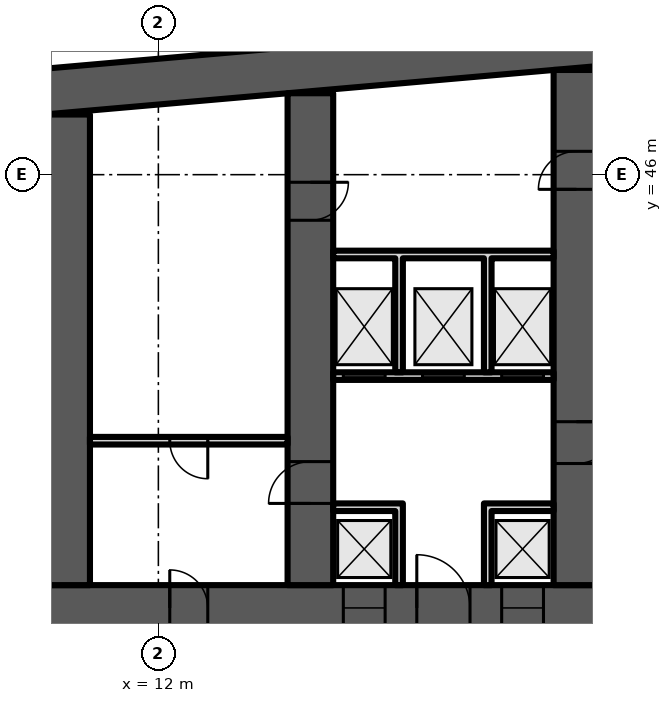
"""IFC4 building model, lengths in metres.
Left out: names, types, materials, properties, quantities, classifications, styles, units other than length and angle.
Written with IfcOpenShell. Run it as: python <this file> out.ifc"""

import sys

from ifc_helpers import new_model, si_unit, direction, frame, frame_2d, origin, place, context, subcontext, project, spatial, polyline, rectangle, outline, extrude, element, fill, save


model = new_model("IFC4")
c1 = context("Model", 3, precision=1e-05, world=origin(), true_north=direction((0.0, 1.0)))
c2 = subcontext(c1, "Body", "Model", "MODEL_VIEW")
j1 = project(units=[si_unit("LENGTHUNIT", "METRE"), si_unit("PLANEANGLEUNIT", "RADIAN")], contexts=[c1])
p1 = place(None, origin())
s1 = spatial("IfcSite", under=j1, at=p1, CompositionType="ELEMENT")
p2 = place(p1, origin())
s2 = spatial("IfcBuilding", under=s1, at=p2, CompositionType="ELEMENT")
p3 = place(p2, frame((0.0, 0.0, 77.5)))
s3 = spatial("IfcBuildingStorey", under=s2, at=p3, CompositionType="ELEMENT", Elevation=77.5)
p4 = place(p3, origin())
e1 = element("IfcWall", 1, at=p4, inside=s3, PredefinedType="SHEAR", context=c2, shape_type="SweptSolid", body=[
    extrude(outline(polyline([(9.0, 47.583), (37.0, 50.032), (65.0, 47.583), (65.0, 48.787), (37.0, 51.237), (9.0, 48.787), (9.0, 47.583)])), origin(), (0.0, 0.0, 1.0), 3.6),
])
p5 = place(p3, frame((9.0, 34.6, 0.0), z_axis=(0.0, 0.0, 1.0), x_axis=(1.0, 0.0, 0.0)))
e2 = element("IfcWall", 2, at=p5, inside=s3, PredefinedType="SHEAR", context=c2, shape_type="SweptSolid", body=[
    extrude(rectangle(XDim=56.0, YDim=1.2, at=frame_2d((28.0, 0.0))), origin(), (0.0, 0.0, 1.0), 3.6),
])
p6 = place(p5, frame((3.3, 0.0, 0.0)))
e3 = element("IfcOpeningElement", 3, at=p6, cuts=e2, PredefinedType="OPENING", context=c2, shape_type="SweptSolid", body=[
    extrude(rectangle(XDim=1.0, YDim=2.1, at=frame_2d((0.5, 1.05))), frame((0.0, 0.61, 0.0), z_axis=(0.0, -1.0, 0.0), x_axis=(1.0, 0.0, 0.0)), (0.0, 0.0, 1.0), 1.22),
])
p7 = place(p5, frame((7.867, 0.0, 0.0)))
e4 = element("IfcOpeningElement", 4, at=p7, cuts=e2, PredefinedType="OPENING", context=c2, shape_type="SweptSolid", body=[
    extrude(rectangle(XDim=1.1, YDim=2.1, at=frame_2d((0.55, 1.05))), frame((0.0, 0.61, 0.0), z_axis=(0.0, -1.0, 0.0), x_axis=(1.0, 0.0, 0.0)), (0.0, 0.0, 1.0), 1.22),
])
p8 = place(p5, frame((12.033, 0.0, 0.0)))
e5 = element("IfcOpeningElement", 5, at=p8, cuts=e2, PredefinedType="OPENING", context=c2, shape_type="SweptSolid", body=[
    extrude(rectangle(XDim=1.1, YDim=2.1, at=frame_2d((0.55, 1.05))), frame((0.0, 0.61, 0.0), z_axis=(0.0, -1.0, 0.0), x_axis=(1.0, 0.0, 0.0)), (0.0, 0.0, 1.0), 1.22),
])
p9 = place(p5, frame((9.8, 0.0, 0.0)))
e6 = element("IfcOpeningElement", 6, at=p9, cuts=e2, PredefinedType="OPENING", context=c2, shape_type="SweptSolid", body=[
    extrude(rectangle(XDim=1.4, YDim=2.1, at=frame_2d((0.7, 1.05))), frame((0.0, 0.61, 0.0), z_axis=(0.0, -1.0, 0.0), x_axis=(1.0, 0.0, 0.0)), (0.0, 0.0, 1.0), 1.22),
])
p10 = place(p5, frame((14.65, 0.0, 0.0)))
e7 = element("IfcOpeningElement", 7, at=p10, cuts=e2, PredefinedType="OPENING", context=c2, shape_type="SweptSolid", body=[
    extrude(rectangle(XDim=1.2, YDim=2.1, at=frame_2d((0.6, 1.05))), frame((0.0, 0.61, 0.0), z_axis=(0.0, -1.0, 0.0), x_axis=(1.0, 0.0, 0.0)), (0.0, 0.0, 1.0), 1.22),
])
p11 = place(p5, frame((21.867, 0.0, 0.0)))
e8 = element("IfcOpeningElement", 8, at=p11, cuts=e2, PredefinedType="OPENING", context=c2, shape_type="SweptSolid", body=[
    extrude(rectangle(XDim=1.1, YDim=2.1, at=frame_2d((0.55, 1.05))), frame((0.0, 0.61, 0.0), z_axis=(0.0, -1.0, 0.0), x_axis=(1.0, 0.0, 0.0)), (0.0, 0.0, 1.0), 1.22),
])
p12 = place(p5, frame((26.033, 0.0, 0.0)))
e9 = element("IfcOpeningElement", 9, at=p12, cuts=e2, PredefinedType="OPENING", context=c2, shape_type="SweptSolid", body=[
    extrude(rectangle(XDim=1.1, YDim=2.1, at=frame_2d((0.55, 1.05))), frame((0.0, 0.61, 0.0), z_axis=(0.0, -1.0, 0.0), x_axis=(1.0, 0.0, 0.0)), (0.0, 0.0, 1.0), 1.22),
])
p13 = place(p5, frame((23.8, 0.0, 0.0)))
e10 = element("IfcOpeningElement", 10, at=p13, cuts=e2, PredefinedType="OPENING", context=c2, shape_type="SweptSolid", body=[
    extrude(rectangle(XDim=1.4, YDim=2.1, at=frame_2d((0.7, 1.05))), frame((0.0, 0.61, 0.0), z_axis=(0.0, -1.0, 0.0), x_axis=(1.0, 0.0, 0.0)), (0.0, 0.0, 1.0), 1.22),
])
p14 = place(p5, frame((28.867, 0.0, 0.0)))
e11 = element("IfcOpeningElement", 11, at=p14, cuts=e2, PredefinedType="OPENING", context=c2, shape_type="SweptSolid", body=[
    extrude(rectangle(XDim=1.1, YDim=2.1, at=frame_2d((0.55, 1.05))), frame((0.0, 0.61, 0.0), z_axis=(0.0, -1.0, 0.0), x_axis=(1.0, 0.0, 0.0)), (0.0, 0.0, 1.0), 1.22),
])
p15 = place(p5, frame((33.033, 0.0, 0.0)))
e12 = element("IfcOpeningElement", 12, at=p15, cuts=e2, PredefinedType="OPENING", context=c2, shape_type="SweptSolid", body=[
    extrude(rectangle(XDim=1.1, YDim=2.1, at=frame_2d((0.55, 1.05))), frame((0.0, 0.61, 0.0), z_axis=(0.0, -1.0, 0.0), x_axis=(1.0, 0.0, 0.0)), (0.0, 0.0, 1.0), 1.22),
])
p16 = place(p5, frame((40.15, 0.0, 0.0)))
e13 = element("IfcOpeningElement", 13, at=p16, cuts=e2, PredefinedType="OPENING", context=c2, shape_type="SweptSolid", body=[
    extrude(rectangle(XDim=1.2, YDim=2.1, at=frame_2d((0.6, 1.05))), frame((0.0, 0.61, 0.0), z_axis=(0.0, -1.0, 0.0), x_axis=(1.0, 0.0, 0.0)), (0.0, 0.0, 1.0), 1.22),
])
p17 = place(p5, frame((44.8, 0.0, 0.0)))
e14 = element("IfcOpeningElement", 14, at=p17, cuts=e2, PredefinedType="OPENING", context=c2, shape_type="SweptSolid", body=[
    extrude(rectangle(XDim=1.4, YDim=2.1, at=frame_2d((0.7, 1.05))), frame((0.0, 0.61, 0.0), z_axis=(0.0, -1.0, 0.0), x_axis=(1.0, 0.0, 0.0)), (0.0, 0.0, 1.0), 1.22),
])
p18 = place(p5, frame((49.867, 0.0, 0.0)))
e15 = element("IfcOpeningElement", 15, at=p18, cuts=e2, PredefinedType="OPENING", context=c2, shape_type="SweptSolid", body=[
    extrude(rectangle(XDim=1.1, YDim=2.1, at=frame_2d((0.55, 1.05))), frame((0.0, 0.61, 0.0), z_axis=(0.0, -1.0, 0.0), x_axis=(1.0, 0.0, 0.0)), (0.0, 0.0, 1.0), 1.22),
])
p19 = place(p5, frame((53.5, 0.0, 0.0)))
e16 = element("IfcOpeningElement", 16, at=p19, cuts=e2, PredefinedType="OPENING", context=c2, shape_type="SweptSolid", body=[
    extrude(rectangle(XDim=1.1, YDim=2.1, at=frame_2d((0.55, 1.05))), frame((0.0, 0.61, 0.0), z_axis=(0.0, -1.0, 0.0), x_axis=(1.0, 0.0, 0.0)), (0.0, 0.0, 1.0), 1.22),
])
p20 = place(p5, frame((51.567, 0.0, 0.0)))
e17 = element("IfcOpeningElement", 17, at=p20, cuts=e2, PredefinedType="OPENING", context=c2, shape_type="SweptSolid", body=[
    extrude(rectangle(XDim=1.4, YDim=2.1, at=frame_2d((0.7, 1.05))), frame((0.0, 0.61, 0.0), z_axis=(0.0, -1.0, 0.0), x_axis=(1.0, 0.0, 0.0)), (0.0, 0.0, 1.0), 1.22),
])
p21 = place(p3, frame((9.6, 35.2, 0.0), z_axis=(0.0, 0.0, 1.0), x_axis=(0.0, 1.0, 0.0)))
e18 = element("IfcWall", 18, at=p21, inside=s3, PredefinedType="SHEAR", context=c2, shape_type="SweptSolid", body=[
    extrude(rectangle(XDim=12.383, YDim=1.2, at=frame_2d((6.191, 0.0))), origin(), (0.0, 0.0, 1.0), 3.6),
])
p22 = place(p3, frame((16.0, 35.2, 0.0), z_axis=(0.0, 0.0, 1.0), x_axis=(0.0, 1.0, 0.0)))
e19 = element("IfcWall", 19, at=p22, inside=s3, PredefinedType="SHEAR", context=c2, shape_type="SweptSolid", body=[
    extrude(rectangle(XDim=12.943, YDim=1.2, at=frame_2d((6.471, 0.0))), origin(), (0.0, 0.0, 1.0), 3.6),
])
p23 = place(p22, frame((2.15, 0.0, 0.0)))
e20 = element("IfcOpeningElement", 20, at=p23, cuts=e19, PredefinedType="OPENING", context=c2, shape_type="SweptSolid", body=[
    extrude(rectangle(XDim=1.1, YDim=2.1, at=frame_2d((0.55, 1.05))), frame((0.0, 0.61, 0.0), z_axis=(0.0, -1.0, 0.0), x_axis=(1.0, 0.0, 0.0)), (0.0, 0.0, 1.0), 1.22),
])
p24 = place(p22, frame((9.6, 0.0, 0.0)))
e21 = element("IfcOpeningElement", 21, at=p24, cuts=e19, PredefinedType="OPENING", context=c2, shape_type="SweptSolid", body=[
    extrude(rectangle(XDim=1.0, YDim=2.1, at=frame_2d((0.5, 1.05))), frame((0.0, 0.61, 0.0), z_axis=(0.0, -1.0, 0.0), x_axis=(1.0, 0.0, 0.0)), (0.0, 0.0, 1.0), 1.22),
])
p25 = place(p3, frame((23.0, 35.2, 0.0), z_axis=(0.0, 0.0, 1.0), x_axis=(0.0, 1.0, 0.0)))
e22 = element("IfcWall", 22, at=p25, inside=s3, PredefinedType="SHEAR", context=c2, shape_type="SweptSolid", body=[
    extrude(rectangle(XDim=13.555, YDim=1.2, at=frame_2d((6.778, 0.0))), origin(), (0.0, 0.0, 1.0), 3.6),
])
p26 = place(p25, frame((10.414, 0.0, 0.0)))
e23 = element("IfcOpeningElement", 23, at=p26, cuts=e22, PredefinedType="OPENING", context=c2, shape_type="SweptSolid", body=[
    extrude(rectangle(XDim=1.0, YDim=2.1, at=frame_2d((0.5, 1.05))), frame((0.0, 0.61, 0.0), z_axis=(0.0, -1.0, 0.0), x_axis=(1.0, 0.0, 0.0)), (0.0, 0.0, 1.0), 1.22),
])
p27 = place(p25, frame((3.2, 0.0, 0.0)))
e24 = element("IfcOpeningElement", 24, at=p27, cuts=e22, PredefinedType="OPENING", context=c2, shape_type="SweptSolid", body=[
    extrude(rectangle(XDim=1.1, YDim=2.1, at=frame_2d((0.55, 1.05))), frame((0.0, 0.61, 0.0), z_axis=(0.0, -1.0, 0.0), x_axis=(1.0, 0.0, 0.0)), (0.0, 0.0, 1.0), 1.22),
])
p28 = place(p3, frame((10.2, 39.0, 0.0), z_axis=(0.0, 0.0, 1.0), x_axis=(1.0, 0.0, 0.0)))
e25 = element("IfcWall", 25, at=p28, inside=s3, PredefinedType="PARTITIONING", context=c2, shape_type="SweptSolid", body=[
    extrude(rectangle(XDim=5.2, YDim=0.2, at=frame_2d((2.6, 0.0))), origin(), (0.0, 0.0, 1.0), 3.2),
])
p29 = place(p28, frame((2.1, 0.0, 0.0)))
e26 = element("IfcOpeningElement", 26, at=p29, cuts=e25, PredefinedType="OPENING", context=c2, shape_type="SweptSolid", body=[
    extrude(rectangle(XDim=1.0, YDim=2.1, at=frame_2d((0.5, 1.05))), frame((0.0, 0.11, 0.0), z_axis=(0.0, -1.0, 0.0), x_axis=(1.0, 0.0, 0.0)), (0.0, 0.0, 1.0), 0.22),
])
p30 = place(p3, frame((16.6, 40.7, 0.0), z_axis=(0.0, 0.0, 1.0), x_axis=(1.0, 0.0, 0.0)))
e27 = element("IfcWall", 27, at=p30, inside=s3, PredefinedType="PARTITIONING", context=c2, shape_type="SweptSolid", body=[
    extrude(rectangle(XDim=5.8, YDim=0.2, at=frame_2d((2.9, 0.0))), origin(), (0.0, 0.0, 1.0), 3.2),
])
p31 = place(p30, frame((0.267, 0.0, 0.0)))
e28 = element("IfcOpeningElement", 28, at=p31, cuts=e27, PredefinedType="OPENING", context=c2, shape_type="SweptSolid", body=[
    extrude(rectangle(XDim=1.1, YDim=2.1, at=frame_2d((0.55, 1.05))), frame((0.0, 0.11, 0.0), z_axis=(0.0, -1.0, 0.0), x_axis=(1.0, 0.0, 0.0)), (0.0, 0.0, 1.0), 0.22),
])
p32 = place(p30, frame((2.35, 0.0, 0.0)))
e29 = element("IfcOpeningElement", 29, at=p32, cuts=e27, PredefinedType="OPENING", context=c2, shape_type="SweptSolid", body=[
    extrude(rectangle(XDim=1.1, YDim=2.1, at=frame_2d((0.55, 1.05))), frame((0.0, 0.11, 0.0), z_axis=(0.0, -1.0, 0.0), x_axis=(1.0, 0.0, 0.0)), (0.0, 0.0, 1.0), 0.22),
])
p33 = place(p30, frame((4.433, 0.0, 0.0)))
e30 = element("IfcOpeningElement", 30, at=p33, cuts=e27, PredefinedType="OPENING", context=c2, shape_type="SweptSolid", body=[
    extrude(rectangle(XDim=1.1, YDim=2.1, at=frame_2d((0.55, 1.05))), frame((0.0, 0.11, 0.0), z_axis=(0.0, -1.0, 0.0), x_axis=(1.0, 0.0, 0.0)), (0.0, 0.0, 1.0), 0.22),
])
p34 = place(p3, frame((0.0, 0.0, -0.0)))
e31 = element("IfcWall", 31, at=p34, inside=s3, PredefinedType="PARTITIONING", context=c2, shape_type="SweptSolid", body=[
    extrude(outline(polyline([(18.233, 37.15), (16.6, 37.15), (16.6, 37.35), (18.233, 37.35), (18.433, 37.35), (18.433, 35.2), (18.233, 35.2), (18.233, 37.15)])), origin(), (0.0, 0.0, 1.0), 3.2),
])
p35 = place(p3, frame((0.0, 0.0, -0.0)))
e32 = element("IfcWall", 32, at=p35, inside=s3, PredefinedType="PARTITIONING", context=c2, shape_type="SweptSolid", body=[
    extrude(outline(polyline([(20.567, 37.35), (20.767, 37.35), (22.4, 37.35), (22.4, 37.15), (20.767, 37.15), (20.767, 35.2), (20.567, 35.2), (20.567, 37.35)])), origin(), (0.0, 0.0, 1.0), 3.2),
])
p36 = place(p3, frame((0.0, 0.0, -0.0)))
e33 = element("IfcWall", 33, at=p36, inside=s3, PredefinedType="PARTITIONING", context=c2, shape_type="SweptSolid", body=[
    extrude(outline(polyline([(18.433, 40.8), (18.233, 40.8), (18.233, 43.8), (16.6, 43.8), (16.6, 44.0), (22.4, 44.0), (22.4, 43.8), (20.767, 43.8), (20.767, 40.8), (20.567, 40.8), (20.567, 43.8), (18.433, 43.8), (18.433, 40.8)])), origin(), (0.0, 0.0, 1.0), 3.2),
])
p37 = place(p6, origin())
e34 = element("IfcDoor", 34, at=p37, inside=s3, OperationType="SINGLE_SWING_LEFT", PredefinedType="DOOR", context=c2, shape_type="SweptSolid", body=[
    extrude(rectangle(XDim=1.0, YDim=2.1, at=frame_2d((0.5, 1.05))), frame((0.0, 0.6, 0.0), z_axis=(0.0, -1.0, 0.0), x_axis=(1.0, 0.0, 0.0)), (0.0, 0.0, 1.0), 1.199),
])
fill(e3, e34)
p38 = place(p29, origin())
e35 = element("IfcDoor", 35, at=p38, inside=s3, OperationType="SINGLE_SWING_RIGHT", PredefinedType="DOOR", context=c2, shape_type="SweptSolid", body=[
    extrude(rectangle(XDim=1.0, YDim=2.1, at=frame_2d((0.5, 1.05))), frame((0.0, 0.025, 0.0), z_axis=(0.0, -1.0, 0.0), x_axis=(1.0, 0.0, 0.0)), (0.0, 0.0, 1.0), 0.05),
])
fill(e26, e35)
p39 = place(p7, origin())
e36 = element("IfcDoor", 36, at=p39, inside=s3, OperationType="DOUBLE_DOOR_SLIDING", PredefinedType="DOOR", context=c2, shape_type="SweptSolid", body=[
    extrude(rectangle(XDim=1.1, YDim=2.1, at=frame_2d((0.55, 1.05))), frame((0.0, 0.025, 0.0), z_axis=(0.0, -1.0, 0.0), x_axis=(1.0, 0.0, 0.0)), (0.0, 0.0, 1.0), 0.05),
])
fill(e4, e36)
p40 = place(p8, origin())
e37 = element("IfcDoor", 37, at=p40, inside=s3, OperationType="DOUBLE_DOOR_SLIDING", PredefinedType="DOOR", context=c2, shape_type="SweptSolid", body=[
    extrude(rectangle(XDim=1.1, YDim=2.1, at=frame_2d((0.55, 1.05))), frame((0.0, 0.025, 0.0), z_axis=(0.0, -1.0, 0.0), x_axis=(1.0, 0.0, 0.0)), (0.0, 0.0, 1.0), 0.05),
])
fill(e5, e37)
p41 = place(p9, origin())
e38 = element("IfcDoor", 38, at=p41, inside=s3, OperationType="DOUBLE_DOOR_SINGLE_SWING", PredefinedType="DOOR", context=c2, shape_type="SweptSolid", body=[
    extrude(rectangle(XDim=1.4, YDim=2.1, at=frame_2d((0.7, 1.05))), frame((0.0, 0.025, 0.0), z_axis=(0.0, -1.0, 0.0), x_axis=(1.0, 0.0, 0.0)), (0.0, 0.0, 1.0), 0.05),
])
fill(e6, e38)
p42 = place(p31, origin())
e39 = element("IfcDoor", 39, at=p42, inside=s3, OperationType="DOUBLE_DOOR_SLIDING", PredefinedType="DOOR", context=c2, shape_type="SweptSolid", body=[
    extrude(rectangle(XDim=1.1, YDim=2.1, at=frame_2d((0.55, 1.05))), frame((0.0, 0.025, 0.0), z_axis=(0.0, -1.0, 0.0), x_axis=(1.0, 0.0, 0.0)), (0.0, 0.0, 1.0), 0.05),
])
fill(e28, e39)
p43 = place(p32, origin())
e40 = element("IfcDoor", 40, at=p43, inside=s3, OperationType="DOUBLE_DOOR_SLIDING", PredefinedType="DOOR", context=c2, shape_type="SweptSolid", body=[
    extrude(rectangle(XDim=1.1, YDim=2.1, at=frame_2d((0.55, 1.05))), frame((0.0, 0.025, 0.0), z_axis=(0.0, -1.0, 0.0), x_axis=(1.0, 0.0, 0.0)), (0.0, 0.0, 1.0), 0.05),
])
fill(e29, e40)
p44 = place(p33, origin())
e41 = element("IfcDoor", 41, at=p44, inside=s3, OperationType="DOUBLE_DOOR_SLIDING", PredefinedType="DOOR", context=c2, shape_type="SweptSolid", body=[
    extrude(rectangle(XDim=1.1, YDim=2.1, at=frame_2d((0.55, 1.05))), frame((0.0, 0.025, 0.0), z_axis=(0.0, -1.0, 0.0), x_axis=(1.0, 0.0, 0.0)), (0.0, 0.0, 1.0), 0.05),
])
fill(e30, e41)
p45 = place(p26, origin())
e42 = element("IfcDoor", 42, at=p45, inside=s3, OperationType="SINGLE_SWING_LEFT", PredefinedType="DOOR", context=c2, shape_type="SweptSolid", body=[
    extrude(rectangle(XDim=1.0, YDim=2.1, at=frame_2d((0.5, 1.05))), frame((0.0, 0.6, 0.0), z_axis=(0.0, -1.0, 0.0), x_axis=(1.0, 0.0, 0.0)), (0.0, 0.0, 1.0), 1.199),
])
fill(e23, e42)
p46 = place(p23, origin())
e43 = element("IfcDoor", 43, at=p46, inside=s3, OperationType="SINGLE_SWING_LEFT", PredefinedType="DOOR", context=c2, shape_type="SweptSolid", body=[
    extrude(rectangle(XDim=1.1, YDim=2.1, at=frame_2d((0.55, 1.05))), frame((0.0, 0.025, 0.0), z_axis=(0.0, -1.0, 0.0), x_axis=(1.0, 0.0, 0.0)), (0.0, 0.0, 1.0), 0.05),
])
fill(e20, e43)
p47 = place(p24, origin())
e44 = element("IfcDoor", 44, at=p47, inside=s3, OperationType="SINGLE_SWING_RIGHT", PredefinedType="DOOR", context=c2, shape_type="SweptSolid", body=[
    extrude(rectangle(XDim=1.0, YDim=2.1, at=frame_2d((0.5, 1.05))), frame((0.0, 0.6, 0.0), z_axis=(0.0, -1.0, 0.0), x_axis=(1.0, 0.0, 0.0)), (0.0, 0.0, 1.0), 1.199),
])
fill(e21, e44)
p48 = place(p27, origin())
e45 = element("IfcDoor", 45, at=p48, inside=s3, OperationType="SINGLE_SWING_RIGHT", PredefinedType="DOOR", context=c2, shape_type="SweptSolid", body=[
    extrude(rectangle(XDim=1.1, YDim=2.1, at=frame_2d((0.55, 1.05))), frame((0.0, 0.025, 0.0), z_axis=(0.0, -1.0, 0.0), x_axis=(1.0, 0.0, 0.0)), (0.0, 0.0, 1.0), 0.05),
])
fill(e24, e45)
save(model, sys.argv[1])
